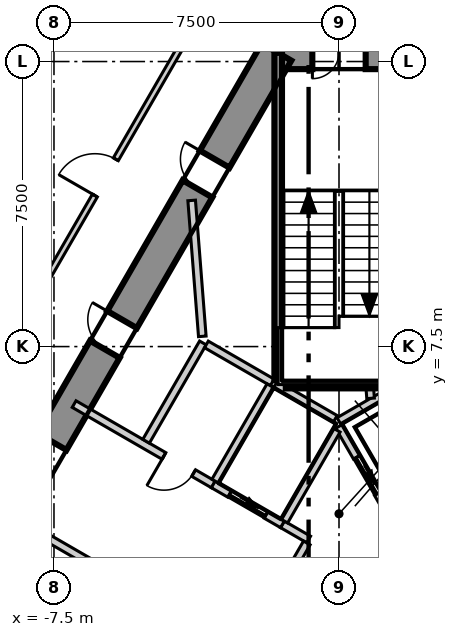
"""IFC4 building model, lengths in metres.
Left out: names, types, materials, properties, quantities, classifications, styles, units other than length and angle.
Written with IfcOpenShell. Run it as: python <this file> out.ifc"""

import sys

from ifc_helpers import new_model, si_unit, direction, frame, frame_2d, origin, place, context, subcontext, project, spatial, polyline, rectangle, outline, extrude, element, fill, save


model = new_model("IFC4")
c1 = context("Model", 3, precision=1e-05, world=origin(), true_north=direction((0.0, 1.0)))
c2 = subcontext(c1, "Body", "Model", "MODEL_VIEW")
j1 = project(units=[si_unit("LENGTHUNIT", "METRE"), si_unit("PLANEANGLEUNIT", "RADIAN")], contexts=[c1])
p1 = place(None, origin())
s1 = spatial("IfcSite", under=j1, at=p1, CompositionType="ELEMENT")
p2 = place(p1, origin())
s2 = spatial("IfcBuilding", under=s1, at=p2, CompositionType="ELEMENT")
p3 = place(p2, frame((0.0, 0.0, 71.3)))
s3 = spatial("IfcBuildingStorey", under=s2, at=p3, CompositionType="ELEMENT", Elevation=71.3)
p4 = place(p3, frame((1.645, 15.25, -0.3), z_axis=(0.0, 0.0, 1.0), x_axis=(-1.0, 0.0, 0.0)))
e1 = element("IfcWall", 1, at=p4, inside=s3, PredefinedType="SHEAR", context=c2, shape_type="SweptSolid", body=[
    extrude(outline(polyline([(-0.26, -0.45), (1.645, -0.45), (3.55, -0.45), (3.031, 0.45), (1.645, 0.45), (0.259, 0.45), (-0.26, -0.45)])), origin(), (0.0, 0.0, 1.0), 4.0),
])
p5 = place(p4, frame((0.945, 0.0, 0.3)))
e2 = element("IfcOpeningElement", 2, at=p5, cuts=e1, PredefinedType="OPENING", context=c2, shape_type="SweptSolid", body=[
    extrude(rectangle(XDim=1.4, YDim=2.1, at=frame_2d((0.7, 1.05))), frame((0.0, 0.46, 0.0), z_axis=(0.0, -1.0, 0.0), x_axis=(1.0, 0.0, 0.0)), (0.0, 0.0, 1.0), 0.92),
])
p6 = place(p3, frame((-1.645, 15.25, -0.3), z_axis=(0.0, 0.0, 1.0), x_axis=(-0.500026485275, -0.866010111964, 0.0)))
e3 = element("IfcWall", 3, at=p6, inside=s3, PredefinedType="SHEAR", context=c2, shape_type="SweptSolid", body=[
    extrude(outline(polyline([(-0.26, -0.45), (1.685, -0.45), (3.63, -0.45), (5.576, -0.45), (7.521, -0.45), (9.466, -0.449), (11.411, -0.449), (13.357, -0.449), (15.302, -0.449), (17.247, -0.449), (19.192, -0.449), (21.138, -0.449), (23.083, -0.449), (25.028, -0.449), (24.509, 0.45), (22.644, 0.45), (20.778, 0.45), (18.913, 0.45), (17.048, 0.45), (15.182, 0.449), (13.317, 0.449), (11.452, 0.449), (9.587, 0.449), (7.721, 0.449), (5.856, 0.449), (3.991, 0.449), (2.125, 0.449), (0.26, 0.449), (-0.26, -0.45)])), origin(), (0.0, 0.0, 1.0), 4.0),
])
p7 = place(p6, frame((11.834, 0.0, 0.3)))
e4 = element("IfcOpeningElement", 4, at=p7, cuts=e3, PredefinedType="OPENING", context=c2, shape_type="SweptSolid", body=[
    extrude(rectangle(XDim=1.1, YDim=2.1, at=frame_2d((0.55, 1.05))), frame((0.0, 0.46, 0.0), z_axis=(0.0, -1.0, 0.0), x_axis=(1.0, 0.0, 0.0)), (0.0, 0.0, 1.0), 0.92),
])
p8 = place(p6, frame((8.13, 0.0, 0.3)))
e5 = element("IfcOpeningElement", 5, at=p8, cuts=e3, PredefinedType="OPENING", context=c2, shape_type="SweptSolid", body=[
    extrude(rectangle(XDim=0.9, YDim=2.1, at=frame_2d((0.45, 1.05))), frame((0.0, 0.46, 0.0), z_axis=(0.0, -1.0, 0.0), x_axis=(1.0, 0.0, 0.0)), (0.0, 0.0, 1.0), 0.92),
])
p9 = place(p6, frame((3.255, 0.0, 0.3)))
e6 = element("IfcOpeningElement", 6, at=p9, cuts=e3, PredefinedType="OPENING", context=c2, shape_type="SweptSolid", body=[
    extrude(rectangle(XDim=0.9, YDim=2.1, at=frame_2d((0.45, 1.05))), frame((0.0, 0.46, 0.0), z_axis=(0.0, -1.0, 0.0), x_axis=(1.0, 0.0, 0.0)), (0.0, 0.0, 1.0), 0.92),
])
p10 = place(p3, frame((-3.326, 37.084, 0.0), z_axis=(0.0, 0.0, 1.0), x_axis=(-0.500000131003, -0.86602532815, 0.0)))
e7 = element("IfcWall", 7, at=p10, inside=s3, PredefinedType="ELEMENTEDWALL", context=c2, shape_type="SweptSolid", body=[
    extrude(rectangle(XDim=60.886, YDim=0.2, at=frame_2d((30.443, 0.0))), origin(), (0.0, 0.0, 1.0), 3.7),
])
p11 = place(p10, frame((2.146, 0.0, 0.9)))
e8 = element("IfcOpeningElement", 8, at=p11, cuts=e7, PredefinedType="OPENING", context=c2, shape_type="SweptSolid", body=[
    extrude(rectangle(XDim=5.6, YDim=2.5, at=frame_2d((2.8, 1.25))), frame((0.0, 0.11, 0.0), z_axis=(0.0, -1.0, 0.0), x_axis=(1.0, 0.0, 0.0)), (0.0, 0.0, 1.0), 0.22),
])
p12 = place(p10, frame((9.434, 0.0, 0.9)))
e9 = element("IfcOpeningElement", 9, at=p12, cuts=e7, PredefinedType="OPENING", context=c2, shape_type="SweptSolid", body=[
    extrude(rectangle(XDim=5.6, YDim=2.5, at=frame_2d((2.8, 1.25))), frame((0.0, 0.11, 0.0), z_axis=(0.0, -1.0, 0.0), x_axis=(1.0, 0.0, 0.0)), (0.0, 0.0, 1.0), 0.22),
])
p13 = place(p10, frame((16.721, 0.0, 0.9)))
e10 = element("IfcOpeningElement", 10, at=p13, cuts=e7, PredefinedType="OPENING", context=c2, shape_type="SweptSolid", body=[
    extrude(rectangle(XDim=5.6, YDim=2.5, at=frame_2d((2.8, 1.25))), frame((0.0, 0.11, 0.0), z_axis=(0.0, -1.0, 0.0), x_axis=(1.0, 0.0, 0.0)), (0.0, 0.0, 1.0), 0.22),
])
p14 = place(p10, frame((24.009, 0.0, 0.9)))
e11 = element("IfcOpeningElement", 11, at=p14, cuts=e7, PredefinedType="OPENING", context=c2, shape_type="SweptSolid", body=[
    extrude(rectangle(XDim=5.6, YDim=2.5, at=frame_2d((2.8, 1.25))), frame((0.0, 0.11, 0.0), z_axis=(0.0, -1.0, 0.0), x_axis=(1.0, 0.0, 0.0)), (0.0, 0.0, 1.0), 0.22),
])
p15 = place(p10, frame((31.297, 0.0, 0.9)))
e12 = element("IfcOpeningElement", 12, at=p15, cuts=e7, PredefinedType="OPENING", context=c2, shape_type="SweptSolid", body=[
    extrude(rectangle(XDim=5.6, YDim=2.5, at=frame_2d((2.8, 1.25))), frame((0.0, 0.11, 0.0), z_axis=(0.0, -1.0, 0.0), x_axis=(1.0, 0.0, 0.0)), (0.0, 0.0, 1.0), 0.22),
])
p16 = place(p10, frame((38.584, 0.0, 0.9)))
e13 = element("IfcOpeningElement", 13, at=p16, cuts=e7, PredefinedType="OPENING", context=c2, shape_type="SweptSolid", body=[
    extrude(rectangle(XDim=5.6, YDim=2.5, at=frame_2d((2.8, 1.25))), frame((0.0, 0.11, 0.0), z_axis=(0.0, -1.0, 0.0), x_axis=(1.0, 0.0, 0.0)), (0.0, 0.0, 1.0), 0.22),
])
p17 = place(p10, frame((45.872, 0.0, 0.9)))
e14 = element("IfcOpeningElement", 14, at=p17, cuts=e7, PredefinedType="OPENING", context=c2, shape_type="SweptSolid", body=[
    extrude(rectangle(XDim=5.6, YDim=2.5, at=frame_2d((2.8, 1.25))), frame((0.0, 0.11, 0.0), z_axis=(0.0, -1.0, 0.0), x_axis=(1.0, 0.0, 0.0)), (0.0, 0.0, 1.0), 0.22),
])
p18 = place(p10, frame((53.159, 0.0, 0.9)))
e15 = element("IfcOpeningElement", 15, at=p18, cuts=e7, PredefinedType="OPENING", context=c2, shape_type="SweptSolid", body=[
    extrude(rectangle(XDim=5.6, YDim=2.5, at=frame_2d((2.8, 1.25))), frame((0.0, 0.11, 0.0), z_axis=(0.0, -1.0, 0.0), x_axis=(1.0, 0.0, 0.0)), (0.0, 0.0, 1.0), 0.22),
])
p19 = place(p3, frame((-19.497, -11.17, 0.0), z_axis=(0.0, 0.0, 1.0), x_axis=(0.499998854553, 0.866026065108, 0.0)))
e16 = element("IfcWall", 16, at=p19, inside=s3, PredefinedType="PARTITIONING", context=c2, shape_type="SweptSolid", body=[
    extrude(rectangle(XDim=38.994, YDim=0.15, at=frame_2d((19.497, 0.0))), origin(), (0.0, 0.0, 1.0), 3.7),
])
p20 = place(p19, frame((35.944, 0.0, 0.0)))
e17 = element("IfcOpeningElement", 17, at=p20, cuts=e16, PredefinedType="OPENING", context=c2, shape_type="SweptSolid", body=[
    extrude(rectangle(XDim=1.1, YDim=2.1, at=frame_2d((0.55, 1.05))), frame((0.0, 0.085, 0.0), z_axis=(0.0, -1.0, 0.0), x_axis=(1.0, 0.0, 0.0)), (0.0, 0.0, 1.0), 0.17),
])
p21 = place(p19, frame((26.148, 0.0, 0.0)))
e18 = element("IfcOpeningElement", 18, at=p21, cuts=e16, PredefinedType="OPENING", context=c2, shape_type="SweptSolid", body=[
    extrude(rectangle(XDim=1.1, YDim=2.1, at=frame_2d((0.55, 1.05))), frame((0.0, 0.085, 0.0), z_axis=(0.0, -1.0, 0.0), x_axis=(1.0, 0.0, 0.0)), (0.0, 0.0, 1.0), 0.17),
])
p22 = place(p19, frame((8.572, 0.0, 0.0)))
e19 = element("IfcOpeningElement", 19, at=p22, cuts=e16, PredefinedType="OPENING", context=c2, shape_type="SweptSolid", body=[
    extrude(rectangle(XDim=1.1, YDim=2.1, at=frame_2d((0.55, 1.05))), frame((0.0, 0.085, 0.0), z_axis=(0.0, -1.0, 0.0), x_axis=(1.0, 0.0, 0.0)), (0.0, 0.0, 1.0), 0.17),
])
p23 = place(p19, frame((17.172, 0.0, 0.0)))
e20 = element("IfcOpeningElement", 20, at=p23, cuts=e16, PredefinedType="OPENING", context=c2, shape_type="SweptSolid", body=[
    extrude(rectangle(XDim=0.9, YDim=2.1, at=frame_2d((0.45, 1.05))), frame((0.0, 0.085, 0.0), z_axis=(0.0, -1.0, 0.0), x_axis=(1.0, 0.0, 0.0)), (0.0, 0.0, 1.0), 0.17),
])
p24 = place(p19, frame((14.172, 0.0, 0.0)))
e21 = element("IfcOpeningElement", 21, at=p24, cuts=e16, PredefinedType="OPENING", context=c2, shape_type="SweptSolid", body=[
    extrude(rectangle(XDim=0.9, YDim=2.1, at=frame_2d((0.45, 1.05))), frame((0.0, 0.085, 0.0), z_axis=(0.0, -1.0, 0.0), x_axis=(1.0, 0.0, 0.0)), (0.0, 0.0, 1.0), 0.17),
])
p25 = place(p19, frame((1.797, 0.0, 0.0)))
e22 = element("IfcOpeningElement", 22, at=p25, cuts=e16, PredefinedType="OPENING", context=c2, shape_type="SweptSolid", body=[
    extrude(rectangle(XDim=1.1, YDim=2.1, at=frame_2d((0.55, 1.05))), frame((0.0, 0.085, 0.0), z_axis=(0.0, -1.0, 0.0), x_axis=(1.0, 0.0, 0.0)), (0.0, 0.0, 1.0), 0.17),
])
p26 = place(p3, frame((0.075, 22.47, 0.0), z_axis=(0.0, 0.0, 1.0), x_axis=(0.500002280369, -0.866024087209, 0.0)))
e23 = element("IfcWall", 23, at=p26, inside=s3, PredefinedType="PARTITIONING", context=c2, shape_type="SweptSolid", body=[
    extrude(rectangle(XDim=38.844, YDim=0.15, at=frame_2d((19.422, 0.0))), origin(), (0.0, 0.0, 1.0), 3.7),
])
p27 = place(p26, frame((35.944, 0.0, 0.0)))
e24 = element("IfcOpeningElement", 24, at=p27, cuts=e23, PredefinedType="OPENING", context=c2, shape_type="SweptSolid", body=[
    extrude(rectangle(XDim=1.1, YDim=2.1, at=frame_2d((0.55, 1.05))), frame((0.0, 0.085, 0.0), z_axis=(0.0, -1.0, 0.0), x_axis=(1.0, 0.0, 0.0)), (0.0, 0.0, 1.0), 0.17),
])
p28 = place(p26, frame((29.848, 0.0, 0.0)))
e25 = element("IfcOpeningElement", 25, at=p28, cuts=e23, PredefinedType="OPENING", context=c2, shape_type="SweptSolid", body=[
    extrude(rectangle(XDim=1.0, YDim=2.1, at=frame_2d((0.5, 1.05))), frame((0.0, 0.085, 0.0), z_axis=(0.0, -1.0, 0.0), x_axis=(1.0, 0.0, 0.0)), (0.0, 0.0, 1.0), 0.17),
])
p29 = place(p26, frame((14.46, 0.0, 0.0)))
e26 = element("IfcOpeningElement", 26, at=p29, cuts=e23, PredefinedType="OPENING", context=c2, shape_type="SweptSolid", body=[
    extrude(rectangle(XDim=1.1, YDim=2.1, at=frame_2d((0.55, 1.05))), frame((0.0, 0.085, 0.0), z_axis=(0.0, -1.0, 0.0), x_axis=(1.0, 0.0, 0.0)), (0.0, 0.0, 1.0), 0.17),
])
p30 = place(p26, frame((24.66, 0.0, 0.0)))
e27 = element("IfcOpeningElement", 27, at=p30, cuts=e23, PredefinedType="OPENING", context=c2, shape_type="SweptSolid", body=[
    extrude(rectangle(XDim=0.9, YDim=2.1, at=frame_2d((0.45, 1.05))), frame((0.0, 0.085, 0.0), z_axis=(0.0, -1.0, 0.0), x_axis=(1.0, 0.0, 0.0)), (0.0, 0.0, 1.0), 0.17),
])
p31 = place(p26, frame((21.46, 0.0, 0.0)))
e28 = element("IfcOpeningElement", 28, at=p31, cuts=e23, PredefinedType="OPENING", context=c2, shape_type="SweptSolid", body=[
    extrude(rectangle(XDim=0.9, YDim=2.1, at=frame_2d((0.45, 1.05))), frame((0.0, 0.085, 0.0), z_axis=(0.0, -1.0, 0.0), x_axis=(1.0, 0.0, 0.0)), (0.0, 0.0, 1.0), 0.17),
])
p32 = place(p26, frame((18.66, 0.0, 0.0)))
e29 = element("IfcOpeningElement", 29, at=p32, cuts=e23, PredefinedType="OPENING", context=c2, shape_type="SweptSolid", body=[
    extrude(rectangle(XDim=1.0, YDim=2.1, at=frame_2d((0.5, 1.05))), frame((0.0, 0.085, 0.0), z_axis=(0.0, -1.0, 0.0), x_axis=(1.0, 0.0, 0.0)), (0.0, 0.0, 1.0), 0.17),
])
p33 = place(p26, frame((6.785, 0.0, 0.0)))
e30 = element("IfcOpeningElement", 30, at=p33, cuts=e23, PredefinedType="OPENING", context=c2, shape_type="SweptSolid", body=[
    extrude(rectangle(XDim=1.0, YDim=2.1, at=frame_2d((0.5, 1.05))), frame((0.0, 0.085, 0.0), z_axis=(0.0, -1.0, 0.0), x_axis=(1.0, 0.0, 0.0)), (0.0, 0.0, 1.0), 0.17),
])
p34 = place(p26, frame((10.485, 0.0, 0.0)))
e31 = element("IfcOpeningElement", 31, at=p34, cuts=e23, PredefinedType="OPENING", context=c2, shape_type="SweptSolid", body=[
    extrude(rectangle(XDim=0.9, YDim=2.1, at=frame_2d((0.45, 1.05))), frame((0.0, 0.085, 0.0), z_axis=(0.0, -1.0, 0.0), x_axis=(1.0, 0.0, 0.0)), (0.0, 0.0, 1.0), 0.17),
])
p35 = place(p26, frame((1.796, 0.0, 0.0)))
e32 = element("IfcOpeningElement", 32, at=p35, cuts=e23, PredefinedType="OPENING", context=c2, shape_type="SweptSolid", body=[
    extrude(rectangle(XDim=1.1, YDim=2.1, at=frame_2d((0.55, 1.05))), frame((0.0, 0.085, 0.0), z_axis=(0.0, -1.0, 0.0), x_axis=(1.0, 0.0, 0.0)), (0.0, 0.0, 1.0), 0.17),
])
p36 = place(p3, frame((-12.693, 7.415, 0.0), z_axis=(0.0, 0.0, 1.0), x_axis=(0.500017889033, 0.8660150753, 0.0)))
e33 = element("IfcWall", 33, at=p36, inside=s3, PredefinedType="PARTITIONING", context=c2, shape_type="SweptSolid", body=[
    extrude(rectangle(XDim=14.426, YDim=0.15, at=frame_2d((7.213, 0.0))), origin(), (0.0, 0.0, 1.0), 3.7),
])
p37 = place(p36, frame((6.751, 0.0, 0.0)))
e34 = element("IfcOpeningElement", 34, at=p37, cuts=e33, PredefinedType="OPENING", context=c2, shape_type="SweptSolid", body=[
    extrude(rectangle(XDim=1.0, YDim=2.1, at=frame_2d((0.5, 1.05))), frame((0.0, 0.085, 0.0), z_axis=(0.0, -1.0, 0.0), x_axis=(1.0, 0.0, 0.0)), (0.0, 0.0, 1.0), 0.17),
])
p38 = place(p3, frame((-0.002, 5.541, 0.0), z_axis=(0.0, 0.0, 1.0), x_axis=(0.86600155993, 0.500041296494, 0.0)))
e35 = element("IfcWall", 35, at=p38, inside=s3, PredefinedType="SOLIDWALL", context=c2, shape_type="SweptSolid", body=[
    extrude(rectangle(XDim=4.132, YDim=0.2, at=frame_2d((2.066, 0.0))), origin(), (0.0, 0.0, 1.0), 3.7),
])
p39 = place(p3, frame((0.0, 5.4, 0.0), z_axis=(0.0, 0.0, 1.0), x_axis=(0.500103862429, -0.865965430478, 0.0)))
e36 = element("IfcWall", 36, at=p39, inside=s3, PredefinedType="SOLIDWALL", context=c2, shape_type="SweptSolid", body=[
    extrude(rectangle(XDim=2.973, YDim=0.2, at=frame_2d((1.487, 0.0))), origin(), (0.0, 0.0, 1.0), 3.7),
])
p40 = place(p39, frame((0.937, 0.0, 0.0)))
e37 = element("IfcOpeningElement", 37, at=p40, cuts=e36, PredefinedType="OPENING", context=c2, shape_type="SweptSolid", body=[
    extrude(rectangle(XDim=1.1, YDim=2.1, at=frame_2d((0.55, 1.05))), frame((0.0, 0.11, 0.0), z_axis=(0.0, -1.0, 0.0), x_axis=(1.0, 0.0, 0.0)), (0.0, 0.0, 1.0), 0.22),
])
p41 = place(p3, frame((-8.67, 3.043, 0.0), z_axis=(0.0, 0.0, 1.0), x_axis=(0.866029956157, -0.499992114976, 0.0)))
e38 = element("IfcWall", 38, at=p41, inside=s3, PredefinedType="SOLIDWALL", context=c2, shape_type="SweptSolid", body=[
    extrude(rectangle(XDim=4.232, YDim=0.2, at=frame_2d((2.116, 0.0))), origin(), (0.0, 0.0, 1.0), 3.7),
])
p42 = place(p41, frame((2.63, 0.0, 0.0)))
e39 = element("IfcOpeningElement", 39, at=p42, cuts=e38, PredefinedType="OPENING", context=c2, shape_type="SweptSolid", body=[
    extrude(rectangle(XDim=1.1, YDim=2.1, at=frame_2d((0.55, 1.05))), frame((0.0, 0.11, 0.0), z_axis=(0.0, -1.0, 0.0), x_axis=(1.0, 0.0, 0.0)), (0.0, 0.0, 1.0), 0.22),
])
p43 = place(p3, frame((-6.97, 5.987, 0.0), z_axis=(0.0, 0.0, 1.0), x_axis=(0.866029956157, -0.499992114976, 0.0)))
e40 = element("IfcWall", 40, at=p43, inside=s3, PredefinedType="SOLIDWALL", context=c2, shape_type="SweptSolid", body=[
    extrude(rectangle(XDim=4.232, YDim=0.2, at=frame_2d((2.116, 0.0))), origin(), (0.0, 0.0, 1.0), 3.7),
])
p44 = place(p43, frame((2.73, 0.0, 0.0)))
e41 = element("IfcOpeningElement", 41, at=p44, cuts=e40, PredefinedType="OPENING", context=c2, shape_type="SweptSolid", body=[
    extrude(rectangle(XDim=0.9, YDim=2.1, at=frame_2d((0.45, 1.05))), frame((0.0, 0.11, 0.0), z_axis=(0.0, -1.0, 0.0), x_axis=(1.0, 0.0, 0.0)), (0.0, 0.0, 1.0), 0.22),
])
p45 = place(p3, frame((-1.488, 2.822, 0.0), z_axis=(0.0, 0.0, 1.0), x_axis=(0.866236612152, -0.499633997809, 0.0)))
e42 = element("IfcWall", 42, at=p45, inside=s3, PredefinedType="SOLIDWALL", context=c2, shape_type="SweptSolid", body=[
    extrude(rectangle(XDim=0.796, YDim=0.2, at=frame_2d((0.398, 0.0))), origin(), (0.0, 0.0, 1.0), 3.7),
])
p46 = place(p3, frame((-5.076, 5.009, 0.0), z_axis=(0.0, 0.0, 1.0), x_axis=(0.500085598968, 0.865975977556, 0.0)))
e43 = element("IfcWall", 43, at=p46, inside=s3, PredefinedType="SOLIDWALL", context=c2, shape_type="SweptSolid", body=[
    extrude(rectangle(XDim=2.987, YDim=0.2, at=frame_2d((1.494, 0.0))), origin(), (0.0, 0.0, 1.0), 3.7),
])
p47 = place(p3, frame((-3.489, 7.557, 0.0), z_axis=(0.0, 0.0, 1.0), x_axis=(0.866010750942, -0.50002537861, 0.0)))
e44 = element("IfcWall", 44, at=p47, inside=s3, PredefinedType="SOLIDWALL", context=c2, shape_type="SweptSolid", body=[
    extrude(rectangle(XDim=2.0, YDim=0.2, at=frame_2d((1.0, 0.0))), origin(), (0.0, 0.0, 1.0), 3.7),
])
p48 = place(p3, frame((-2.444, -0.433, 0.0), z_axis=(0.0, 0.0, 1.0), x_axis=(0.500035624827, 0.866004834804, 0.0)))
e45 = element("IfcWall", 45, at=p48, inside=s3, PredefinedType="SOLIDWALL", context=c2, shape_type="SweptSolid", body=[
    extrude(rectangle(XDim=3.194, YDim=0.2, at=frame_2d((1.597, 0.0))), origin(), (0.0, 0.0, 1.0), 3.7),
])
p49 = place(p3, frame((-3.309, 3.873, 0.0), z_axis=(0.0, 0.0, 1.0), x_axis=(0.866098583652, -0.499873227325, 0.0)))
e46 = element("IfcWall", 46, at=p49, inside=s3, PredefinedType="SOLIDWALL", context=c2, shape_type="SweptSolid", body=[
    extrude(rectangle(XDim=2.103, YDim=0.2, at=frame_2d((1.051, 0.0))), origin(), (0.0, 0.0, 1.0), 3.7),
])
p50 = place(p49, frame((0.502, 0.0, 0.0)))
e47 = element("IfcOpeningElement", 47, at=p50, cuts=e46, PredefinedType="OPENING", context=c2, shape_type="SweptSolid", body=[
    extrude(rectangle(XDim=1.1, YDim=2.1, at=frame_2d((0.55, 1.05))), frame((0.0, 0.11, 0.0), z_axis=(0.0, -1.0, 0.0), x_axis=(1.0, 0.0, 0.0)), (0.0, 0.0, 1.0), 0.22),
])
p51 = place(p3, frame((-3.257, 3.959, 0.0), z_axis=(0.0, 0.0, 1.0), x_axis=(0.50012328804, 0.865954211699, 0.0)))
e48 = element("IfcWall", 48, at=p51, inside=s3, PredefinedType="SOLIDWALL", context=c2, shape_type="SweptSolid", body=[
    extrude(rectangle(XDim=2.9, YDim=0.2, at=frame_2d((1.45, 0.0))), origin(), (0.0, 0.0, 1.0), 3.7),
])
p52 = place(p3, frame((-1.67, 6.507, 0.0), z_axis=(0.0, 0.0, 1.0), x_axis=(0.865941441609, -0.500145398563, 0.0)))
e49 = element("IfcWall", 49, at=p52, inside=s3, PredefinedType="SOLIDWALL", context=c2, shape_type="SweptSolid", body=[
    extrude(rectangle(XDim=1.815, YDim=0.2, at=frame_2d((0.908, 0.0))), origin(), (0.0, 0.0, 1.0), 3.7),
])
p53 = place(p3, frame((-1.438, 2.909, 0.0), z_axis=(0.0, 0.0, 1.0), x_axis=(0.499829630636, 0.866123744241, 0.0)))
e50 = element("IfcWall", 50, at=p53, inside=s3, PredefinedType="SOLIDWALL", context=c2, shape_type="SweptSolid", body=[
    extrude(rectangle(XDim=2.761, YDim=0.2, at=frame_2d((1.38, 0.0))), origin(), (0.0, 0.0, 1.0), 3.7),
])
p54 = place(p3, frame((-3.877, 11.345, 0.0), z_axis=(0.0, 0.0, 1.0), x_axis=(0.078070537984, -0.996947837702, 0.0)))
e51 = element("IfcWall", 51, at=p54, inside=s3, PredefinedType="SOLIDWALL", context=c2, shape_type="SweptSolid", body=[
    extrude(rectangle(XDim=3.587, YDim=0.2, at=frame_2d((1.793, 0.0))), origin(), (0.0, 0.0, 1.0), 3.7),
])
p55 = place(p3, frame((0.811, 6.4, 0.0), z_axis=(0.0, 0.0, 1.0), x_axis=(0.076199063602, -0.997092624938, 0.0)))
e52 = element("IfcWall", 52, at=p55, inside=s3, PredefinedType="SOLIDWALL", context=c2, shape_type="SweptSolid", body=[
    extrude(rectangle(XDim=0.263, YDim=0.2, at=frame_2d((0.131, 0.0))), origin(), (0.0, 0.0, 1.0), 3.7),
])
p56 = place(p3, frame((-1.4, 6.5, 0.0), z_axis=(0.0, 0.0, 1.0), x_axis=(1.0, 0.0, 0.0)))
e53 = element("IfcWall", 53, at=p56, inside=s3, PredefinedType="SOLIDWALL", context=c2, shape_type="SweptSolid", body=[
    extrude(rectangle(XDim=2.8, YDim=0.2, at=frame_2d((1.4, 0.0))), origin(), (0.0, 0.0, 1.0), 3.7),
])
p57 = place(p3, frame((-1.6, 6.615, 0.0), z_axis=(0.0, 0.0, 1.0), x_axis=(0.0, 1.0, 0.0)))
e54 = element("IfcWall", 54, at=p57, inside=s3, PredefinedType="SOLIDWALL", context=c2, shape_type="SweptSolid", body=[
    extrude(rectangle(XDim=8.615, YDim=0.2, at=frame_2d((4.308, 0.0))), origin(), (0.0, 0.0, 1.0), 3.7),
])
p58 = place(p40, origin())
e55 = element("IfcDoor", 55, at=p58, inside=s3, OperationType="SLIDING_TO_LEFT", PredefinedType="DOOR", context=c2, shape_type="SweptSolid", body=[
    extrude(rectangle(XDim=1.1, YDim=2.1, at=frame_2d((0.55, 1.05))), frame((0.0, 0.025, 0.0), z_axis=(0.0, -1.0, 0.0), x_axis=(1.0, 0.0, 0.0)), (0.0, 0.0, 1.0), 0.05),
])
fill(e37, e55)
p59 = place(p50, origin())
e56 = element("IfcDoor", 56, at=p59, inside=s3, OperationType="SLIDING_TO_LEFT", PredefinedType="DOOR", context=c2, shape_type="SweptSolid", body=[
    extrude(rectangle(XDim=1.1, YDim=2.1, at=frame_2d((0.55, 1.05))), frame((0.0, 0.025, 0.0), z_axis=(0.0, -1.0, 0.0), x_axis=(1.0, 0.0, 0.0)), (0.0, 0.0, 1.0), 0.05),
])
fill(e47, e56)
p60 = place(p44, origin())
e57 = element("IfcDoor", 57, at=p60, inside=s3, OperationType="SINGLE_SWING_LEFT", PredefinedType="DOOR", context=c2, shape_type="SweptSolid", body=[
    extrude(rectangle(XDim=0.9, YDim=2.1, at=frame_2d((0.45, 1.05))), frame((0.0, 0.025, 0.0), z_axis=(0.0, -1.0, 0.0), x_axis=(1.0, 0.0, 0.0)), (0.0, 0.0, 1.0), 0.05),
])
fill(e41, e57)
p61 = place(p21, origin())
e58 = element("IfcDoor", 58, at=p61, inside=s3, OperationType="SINGLE_SWING_RIGHT", PredefinedType="DOOR", context=c2, shape_type="SweptSolid", body=[
    extrude(rectangle(XDim=1.1, YDim=2.1, at=frame_2d((0.55, 1.05))), frame((0.0, 0.025, 0.0), z_axis=(0.0, -1.0, 0.0), x_axis=(1.0, 0.0, 0.0)), (0.0, 0.0, 1.0), 0.05),
])
fill(e18, e58)
p62 = place(p5, origin())
e59 = element("IfcDoor", 59, at=p62, inside=s3, OperationType="DOUBLE_DOOR_SINGLE_SWING", PredefinedType="DOOR", context=c2, shape_type="SweptSolid", body=[
    extrude(rectangle(XDim=1.4, YDim=2.1, at=frame_2d((0.7, 1.05))), frame((0.0, 0.025, 0.0), z_axis=(0.0, -1.0, 0.0), x_axis=(1.0, 0.0, 0.0)), (0.0, 0.0, 1.0), 0.05),
])
fill(e2, e59)
p63 = place(p7, origin())
e60 = element("IfcDoor", 60, at=p63, inside=s3, OperationType="SINGLE_SWING_LEFT", PredefinedType="DOOR", context=c2, shape_type="SweptSolid", body=[
    extrude(rectangle(XDim=1.1, YDim=2.1, at=frame_2d((0.55, 1.05))), frame((0.0, 0.025, 0.0), z_axis=(0.0, -1.0, 0.0), x_axis=(1.0, 0.0, 0.0)), (0.0, 0.0, 1.0), 0.05),
])
fill(e4, e60)
p64 = place(p8, origin())
e61 = element("IfcDoor", 61, at=p64, inside=s3, OperationType="SINGLE_SWING_LEFT", PredefinedType="DOOR", context=c2, shape_type="SweptSolid", body=[
    extrude(rectangle(XDim=0.9, YDim=2.1, at=frame_2d((0.45, 1.05))), frame((0.0, 0.025, 0.0), z_axis=(0.0, -1.0, 0.0), x_axis=(1.0, 0.0, 0.0)), (0.0, 0.0, 1.0), 0.05),
])
fill(e5, e61)
p65 = place(p9, origin())
e62 = element("IfcDoor", 62, at=p65, inside=s3, OperationType="SINGLE_SWING_LEFT", PredefinedType="DOOR", context=c2, shape_type="SweptSolid", body=[
    extrude(rectangle(XDim=0.9, YDim=2.1, at=frame_2d((0.45, 1.05))), frame((0.0, 0.025, 0.0), z_axis=(0.0, -1.0, 0.0), x_axis=(1.0, 0.0, 0.0)), (0.0, 0.0, 1.0), 0.05),
])
fill(e6, e62)
save(model, sys.argv[1])
